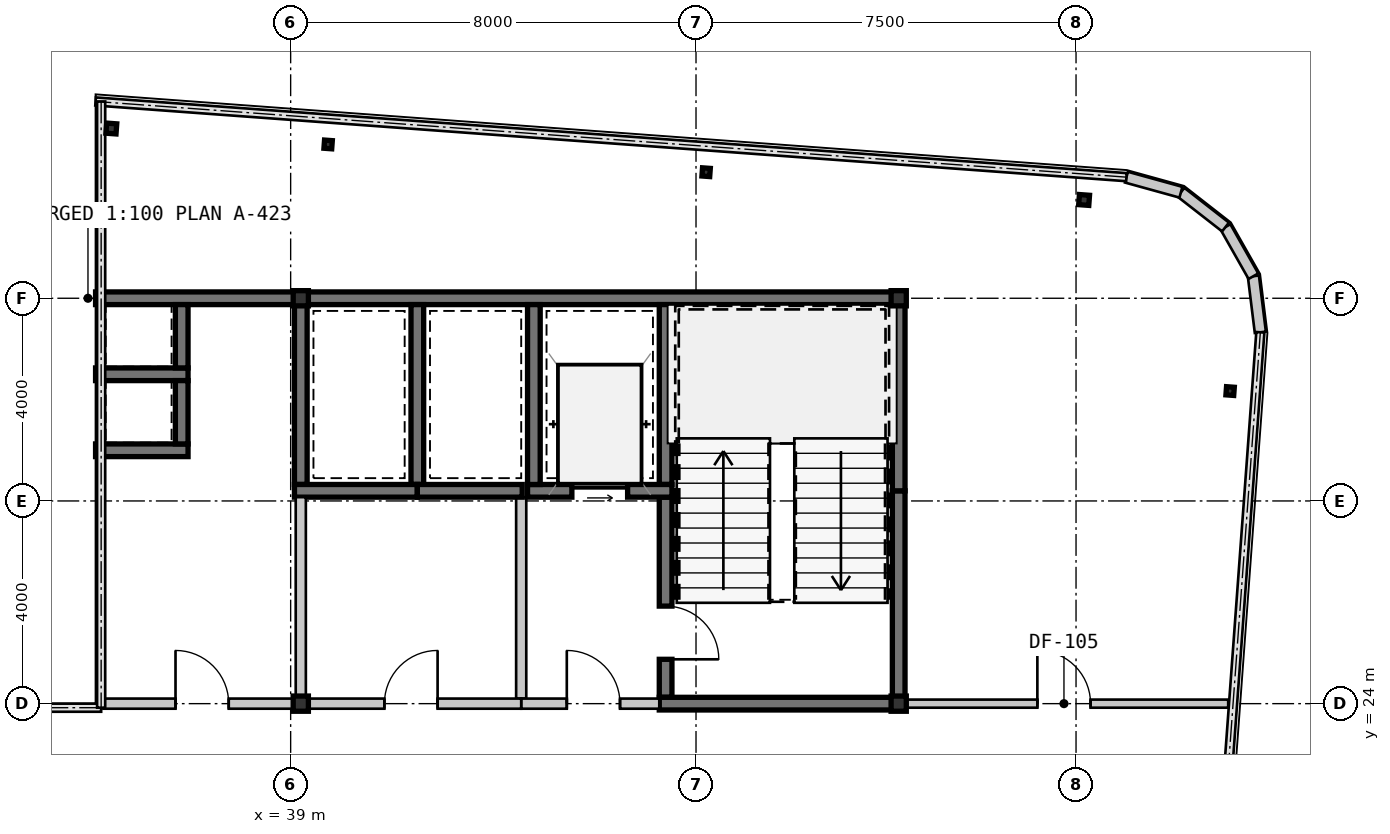
"""IFC4 building model, lengths in metres.
Left out: names, types, materials, properties, quantities, classifications, styles, units other than length and angle.
Written with IfcOpenShell. Run it as: python <this file> out.ifc"""

import sys

from ifc_helpers import new_model, si_unit, direction, frame, frame_2d, origin, origin_2d, place, context, subcontext, project, spatial, rectangle, hollow_rectangle, i_section, extrude, source, transform, mapped, element, fill, save


model = new_model("IFC4")
c1 = context("Model", 3, precision=1e-05, world=origin(), true_north=direction((0.0, 1.0)))
c2 = subcontext(c1, "Body", "Model", "MODEL_VIEW")
j1 = project(units=[si_unit("LENGTHUNIT", "METRE"), si_unit("PLANEANGLEUNIT", "RADIAN")], contexts=[c1])
p1 = place(None, origin())
s1 = spatial("IfcSite", under=j1, at=p1, CompositionType="ELEMENT")
p2 = place(p1, origin())
s2 = spatial("IfcBuilding", under=s1, at=p2, CompositionType="ELEMENT")
p3 = place(p2, frame((0.0, 0.0, 230.3)))
s3 = spatial("IfcBuildingStorey", under=s2, at=p3, CompositionType="ELEMENT", Elevation=230.3)
m1 = source(origin(), c2, "Body", "SweptSolid", [
    extrude(hollow_rectangle(XDim=0.3, YDim=0.3, WallThickness=0.012, at=origin_2d()), origin(), (0.0, 0.0, 1.0), 3.15),
])
for number, where, z_axis, x_axis in (
    (1, (39.2, 24.0, 0.0), (0.0, 0.0, 1.0), (1.0, 0.0, 0.0)),
    (2, (51.0, 24.0, 0.0), (0.0, 0.0, 1.0), (1.0, 0.0, 0.0)),
    (3, (39.2, 32.0, 0.0), (0.0, 0.0, 1.0), (1.0, 0.0, 0.0)),
    (4, (51.0, 32.0, 0.0), (0.0, 0.0, 1.0), (1.0, 0.0, 0.0)),
):
    element("IfcColumn", number, at=place(p3, frame(where, z_axis=z_axis, x_axis=x_axis)), inside=s3, PredefinedType="COLUMN", context=c2, shape_type="MappedRepresentation", body=[
        mapped(m1, transform((0.0, 0.0, 0.0), scale=1.0)),
    ])
m2 = source(origin(), c2, "Body", "SweptSolid", [
    extrude(i_section(OverallWidth=0.154, OverallDepth=0.162, WebThickness=0.008, FlangeThickness=0.011, at=origin_2d()), origin(), (0.0, 0.0, 1.0), 3.15),
])
for number, where, z_axis, x_axis in (
    (5, (39.74, 35.035, 0.0), (0.0, 0.0, 1.0), (0.997, -0.073, 0.0)),
    (6, (47.199, 34.488, 0.0), (0.0, 0.0, 1.0), (0.997, -0.073, 0.0)),
):
    element("IfcColumn", number, at=place(p3, frame(where, z_axis=z_axis, x_axis=x_axis)), inside=s3, PredefinedType="COLUMN", context=c2, shape_type="MappedRepresentation", body=[
        mapped(m2, transform((0.0, 0.0, 0.0), scale=1.0)),
    ])
m3 = source(origin(), c2, "Body", "SweptSolid", [
    extrude(hollow_rectangle(XDim=0.2, YDim=0.2, WallThickness=0.009, at=origin_2d()), origin(), (0.0, 0.0, 1.0), 3.15),
])
p4 = place(p3, frame((54.659, 33.94, 0.0), z_axis=(0.0, 0.0, 1.0), x_axis=(0.997314477224, -0.073238197128, 0.0)))
e7 = element("IfcColumn", 7, at=p4, inside=s3, PredefinedType="COLUMN", context=c2, shape_type="MappedRepresentation", body=[
    mapped(m3, transform((0.0, 0.0, 0.0), scale=1.0)),
])
p5 = place(p3, frame((57.541, 30.169, 0.0), z_axis=(0.0, 0.0, 1.0), x_axis=(0.997314477224, -0.073238197128, 0.0)))
e8 = element("IfcColumn", 8, at=p5, inside=s3, PredefinedType="COLUMN", context=c2, shape_type="MappedRepresentation", body=[
    mapped(m2, transform((0.0, 0.0, 0.0), scale=1.0)),
])
p6 = place(p3, frame((35.461, 35.35, 0.0), z_axis=(0.0, 0.0, 1.0), x_axis=(0.997314477224, -0.073238197128, 0.0)))
e9 = element("IfcColumn", 9, at=p6, inside=s3, PredefinedType="COLUMN", context=c2, shape_type="MappedRepresentation", body=[
    mapped(m3, transform((0.0, 0.0, 0.0), scale=1.0)),
])
m4 = source(origin(), c2, "Body", "SweptSolid", [
    extrude(rectangle(XDim=1.116, YDim=0.22, at=frame_2d((0.558, 0.0))), origin(), (0.0, 0.0, 1.0), 2.93),
])
p7 = place(p3, frame((58.137, 31.328, 0.0), z_axis=(0.0, 0.0, 1.0), x_axis=(-0.122742076028, 0.992438604032, 0.0)))
e10 = element("IfcWall", 10, at=p7, inside=s3, PredefinedType="SOLIDWALL", context=c2, shape_type="MappedRepresentation", body=[
    mapped(m4, transform((0.0, 0.0, 0.0), scale=1.0)),
])
m5 = source(origin(), c2, "Body", "SweptSolid", [
    extrude(rectangle(XDim=1.116, YDim=0.22, at=frame_2d((0.558, 0.0))), origin(), (0.0, 0.0, 1.0), 2.93),
])
p8 = place(p3, frame((58.0, 32.436, 0.0), z_axis=(0.0, 0.0, 1.0), x_axis=(-0.493167138628, 0.869934579941, 0.0)))
e11 = element("IfcWall", 11, at=p8, inside=s3, PredefinedType="SOLIDWALL", context=c2, shape_type="MappedRepresentation", body=[
    mapped(m5, transform((0.0, 0.0, 0.0), scale=1.0)),
])
p9 = place(p3, frame((57.45, 33.406, 0.0), z_axis=(0.0, 0.0, 1.0), x_axis=(-0.788597772321, 0.614909386406, 0.0)))
e12 = element("IfcWall", 12, at=p9, inside=s3, PredefinedType="SOLIDWALL", context=c2, shape_type="MappedRepresentation", body=[
    mapped(m4, transform((0.0, 0.0, 0.0), scale=1.0)),
])
p10 = place(p3, frame((56.57, 34.093, 0.0), z_axis=(0.0, 0.0, 1.0), x_axis=(-0.963833843713, 0.266503886865, 0.0)))
e13 = element("IfcWall", 13, at=p10, inside=s3, PredefinedType="SOLIDWALL", context=c2, shape_type="MappedRepresentation", body=[
    mapped(m5, transform((0.0, 0.0, 0.0), scale=1.0)),
])
m6 = source(origin(), c2, "Body", "SweptSolid", [
    extrude(rectangle(XDim=4.05, YDim=0.25, at=frame_2d((2.025, 0.0))), origin(), (0.0, 0.0, 1.0), 2.93),
])
p11 = place(p3, frame((35.15, 32.0, 0.0), z_axis=(0.0, 0.0, 1.0), x_axis=(1.0, 0.0, 0.0)))
e14 = element("IfcWall", 14, at=p11, inside=s3, PredefinedType="SHEAR", context=c2, shape_type="MappedRepresentation", body=[
    mapped(m6, transform((0.0, 0.0, 0.0), scale=1.0)),
])
m7 = source(origin(), c2, "Body", "SweptSolid", [
    extrude(rectangle(XDim=11.925, YDim=0.25, at=frame_2d((5.962, 0.0))), origin(), (0.0, 0.0, 1.0), 2.93),
])
p12 = place(p3, frame((39.2, 32.0, 0.0), z_axis=(0.0, 0.0, 1.0), x_axis=(1.0, 0.0, 0.0)))
e15 = element("IfcWall", 15, at=p12, inside=s3, PredefinedType="SHEAR", context=c2, shape_type="MappedRepresentation", body=[
    mapped(m7, transform((0.0, 0.0, 0.0), scale=1.0)),
])
m8 = source(origin(), c2, "Body", "SweptSolid", [
    extrude(rectangle(XDim=4.075, YDim=0.25, at=frame_2d((2.038, 0.0))), origin(), (0.0, 0.0, 1.0), 2.93),
])
p13 = place(p3, frame((51.0, 24.125, 0.0), z_axis=(0.0, 0.0, 1.0), x_axis=(0.0, 1.0, 0.0)))
e16 = element("IfcWall", 16, at=p13, inside=s3, PredefinedType="SHEAR", context=c2, shape_type="MappedRepresentation", body=[
    mapped(m8, transform((0.0, 0.0, 0.0), scale=1.0)),
])
m9 = source(origin(), c2, "Body", "SweptSolid", [
    extrude(rectangle(XDim=3.675, YDim=0.25, at=frame_2d((1.837, 0.0))), origin(), (0.0, 0.0, 1.0), 2.93),
])
p14 = place(p3, frame((51.0, 28.2, 0.0), z_axis=(0.0, 0.0, 1.0), x_axis=(0.0, 1.0, 0.0)))
e17 = element("IfcWall", 17, at=p14, inside=s3, PredefinedType="SHEAR", context=c2, shape_type="MappedRepresentation", body=[
    mapped(m9, transform((0.0, 0.0, 0.0), scale=1.0)),
])
m10 = source(origin(), c2, "Body", "SweptSolid", [
    extrude(rectangle(XDim=3.55, YDim=0.25, at=frame_2d((1.775, 0.0))), origin(), (0.0, 0.0, 1.0), 2.93),
])
p15 = place(p3, frame((46.4, 31.875, 0.0), z_axis=(0.0, 0.0, 1.0), x_axis=(0.0, -1.0, 0.0)))
e18 = element("IfcWall", 18, at=p15, inside=s3, PredefinedType="SHEAR", context=c2, shape_type="MappedRepresentation", body=[
    mapped(m10, transform((0.0, 0.0, 0.0), scale=1.0)),
])
m11 = source(origin(), c2, "Body", "SweptSolid", [
    extrude(rectangle(XDim=3.95, YDim=0.25, at=frame_2d((1.975, 0.0))), origin(), (0.0, 0.0, 1.0), 2.93),
])
p16 = place(p3, frame((46.4, 28.075, 0.0), z_axis=(0.0, 0.0, 1.0), x_axis=(0.0, -1.0, 0.0)))
e19 = element("IfcWall", 19, at=p16, inside=s3, PredefinedType="SHEAR", context=c2, shape_type="MappedRepresentation", body=[
    mapped(m11, transform((0.0, 0.0, 0.0), scale=1.0)),
])
m12 = source(origin(), c2, "Body", "SweptSolid", [
    extrude(rectangle(XDim=1.05, YDim=2.1, at=frame_2d((0.525, 1.05))), frame((0.0, 0.135, 0.0), z_axis=(0.0, -1.0, 0.0), x_axis=(1.0, 0.0, 0.0)), (0.0, 0.0, 1.0), 0.27),
])
p17 = place(p16, frame((2.15, 0.0, 0.0)))
e20 = element("IfcOpeningElement", 20, at=p17, cuts=e19, PredefinedType="OPENING", context=c2, shape_type="MappedRepresentation", body=[
    mapped(m12, transform((0.0, 0.0, 0.0), scale=1.0)),
])
m13 = source(origin(), c2, "Body", "SweptSolid", [
    extrude(rectangle(XDim=4.85, YDim=0.25, at=frame_2d((2.425, 0.0))), origin(), (0.0, 0.0, 1.0), 2.93),
])
p18 = place(p3, frame((46.275, 24.0, 0.0), z_axis=(0.0, 0.0, 1.0), x_axis=(1.0, 0.0, 0.0)))
e21 = element("IfcWall", 21, at=p18, inside=s3, PredefinedType="SHEAR", context=c2, shape_type="MappedRepresentation", body=[
    mapped(m13, transform((0.0, 0.0, 0.0), scale=1.0)),
])
m14 = source(origin(), c2, "Body", "SweptSolid", [
    extrude(rectangle(XDim=2.85, YDim=0.25, at=frame_2d((1.425, 0.0))), origin(), (0.0, 0.0, 1.0), 2.93),
])
p19 = place(p3, frame((43.675, 28.2, 0.0), z_axis=(0.0, 0.0, 1.0), x_axis=(1.0, 0.0, 0.0)))
e22 = element("IfcWall", 22, at=p19, inside=s3, PredefinedType="SHEAR", context=c2, shape_type="MappedRepresentation", body=[
    mapped(m14, transform((0.0, 0.0, 0.0), scale=1.0)),
])
m15 = source(origin(), c2, "Body", "SweptSolid", [
    extrude(rectangle(XDim=1.1, YDim=2.15, at=frame_2d((0.55, 1.075))), frame((0.0, 0.135, 0.0), z_axis=(0.0, -1.0, 0.0), x_axis=(1.0, 0.0, 0.0)), (0.0, 0.0, 1.0), 0.27),
])
p20 = place(p19, frame((0.875, 0.0, 0.0)))
e23 = element("IfcOpeningElement", 23, at=p20, cuts=e22, PredefinedType="OPENING", context=c2, shape_type="MappedRepresentation", body=[
    mapped(m15, transform((0.0, 0.0, 0.0), scale=1.0)),
])
p21 = place(p3, frame((43.8, 31.875, 0.0), z_axis=(0.0, 0.0, 1.0), x_axis=(0.0, -1.0, 0.0)))
e24 = element("IfcWall", 24, at=p21, inside=s3, PredefinedType="SHEAR", context=c2, shape_type="MappedRepresentation", body=[
    mapped(m10, transform((0.0, 0.0, 0.0), scale=1.0)),
])
m16 = source(origin(), c2, "Body", "SweptSolid", [
    extrude(rectangle(XDim=3.975, YDim=0.2, at=frame_2d((1.987, 0.0))), origin(), (0.0, 0.0, 1.0), 2.93),
])
p22 = place(p3, frame((43.55, 28.075, 0.0), z_axis=(0.0, 0.0, 1.0), x_axis=(0.0, -1.0, 0.0)))
e25 = element("IfcWall", 25, at=p22, inside=s3, PredefinedType="SOLIDWALL", context=c2, shape_type="MappedRepresentation", body=[
    mapped(m16, transform((0.0, 0.0, 0.0), scale=1.0)),
])
m17 = source(origin(), c2, "Body", "SweptSolid", [
    extrude(rectangle(XDim=2.725, YDim=0.2, at=frame_2d((1.362, 0.0))), origin(), (0.0, 0.0, 1.0), 2.397),
])
p23 = place(p3, frame((43.55, 24.0, 0.0), z_axis=(0.0, 0.0, 1.0), x_axis=(1.0, 0.0, 0.0)))
e26 = element("IfcWall", 26, at=p23, inside=s3, PredefinedType="SOLIDWALL", context=c2, shape_type="MappedRepresentation", body=[
    mapped(m17, transform((0.0, 0.0, 0.0), scale=1.0)),
])
m18 = source(origin(), c2, "Body", "SweptSolid", [
    extrude(rectangle(XDim=1.05, YDim=2.1, at=frame_2d((0.525, 1.05))), frame((0.0, 0.11, 0.0), z_axis=(0.0, -1.0, 0.0), x_axis=(1.0, 0.0, 0.0)), (0.0, 0.0, 1.0), 0.22),
])
p24 = place(p23, frame((0.9, 0.0, 0.0)))
e27 = element("IfcOpeningElement", 27, at=p24, cuts=e26, PredefinedType="OPENING", context=c2, shape_type="MappedRepresentation", body=[
    mapped(m18, transform((0.0, 0.0, 0.0), scale=1.0)),
])
m19 = source(origin(), c2, "Body", "SweptSolid", [
    extrude(rectangle(XDim=1.825, YDim=0.25, at=frame_2d((0.913, 0.0))), origin(), (0.0, 0.0, 1.0), 2.93),
])
p25 = place(p3, frame((35.15, 30.5, 0.0), z_axis=(0.0, 0.0, 1.0), x_axis=(1.0, 0.0, 0.0)))
e28 = element("IfcWall", 28, at=p25, inside=s3, PredefinedType="SHEAR", context=c2, shape_type="MappedRepresentation", body=[
    mapped(m19, transform((0.0, 0.0, 0.0), scale=1.0)),
])
m20 = source(origin(), c2, "Body", "SweptSolid", [
    extrude(rectangle(XDim=1.25, YDim=0.25, at=frame_2d((0.625, 0.0))), origin(), (0.0, 0.0, 1.0), 2.93),
])
p26 = place(p3, frame((36.85, 30.625, 0.0), z_axis=(0.0, 0.0, 1.0), x_axis=(0.0, 1.0, 0.0)))
e29 = element("IfcWall", 29, at=p26, inside=s3, PredefinedType="SHEAR", context=c2, shape_type="MappedRepresentation", body=[
    mapped(m20, transform((0.0, 0.0, 0.0), scale=1.0)),
])
p27 = place(p3, frame((35.15, 29.0, 0.0), z_axis=(0.0, 0.0, 1.0), x_axis=(1.0, 0.0, 0.0)))
e30 = element("IfcWall", 30, at=p27, inside=s3, PredefinedType="SHEAR", context=c2, shape_type="MappedRepresentation", body=[
    mapped(m19, transform((0.0, 0.0, 0.0), scale=1.0)),
])
p28 = place(p3, frame((36.85, 29.125, 0.0), z_axis=(0.0, 0.0, 1.0), x_axis=(0.0, 1.0, 0.0)))
e31 = element("IfcWall", 31, at=p28, inside=s3, PredefinedType="SHEAR", context=c2, shape_type="MappedRepresentation", body=[
    mapped(m20, transform((0.0, 0.0, 0.0), scale=1.0)),
])
for number, where, z_axis, x_axis in (
    (32, (41.5, 28.325, 0.0), (0.0, 0.0, 1.0), (0.0, 1.0, 0.0)),
    (33, (39.2, 31.875, 0.0), (0.0, 0.0, 1.0), (0.0, -1.0, 0.0)),
):
    element("IfcWall", number, at=place(p3, frame(where, z_axis=z_axis, x_axis=x_axis)), inside=s3, PredefinedType="SHEAR", context=c2, shape_type="MappedRepresentation", body=[
        mapped(m10, transform((0.0, 0.0, 0.0), scale=1.0)),
    ])
m21 = source(origin(), c2, "Body", "SweptSolid", [
    extrude(rectangle(XDim=2.425, YDim=0.25, at=frame_2d((1.212, 0.0))), origin(), (0.0, 0.0, 1.0), 2.93),
])
p29 = place(p3, frame((39.075, 28.2, 0.0), z_axis=(0.0, 0.0, 1.0), x_axis=(1.0, 0.0, 0.0)))
e34 = element("IfcWall", 34, at=p29, inside=s3, PredefinedType="SHEAR", context=c2, shape_type="MappedRepresentation", body=[
    mapped(m21, transform((0.0, 0.0, 0.0), scale=1.0)),
])
m22 = source(origin(), c2, "Body", "SweptSolid", [
    extrude(rectangle(XDim=2.07, YDim=0.25, at=frame_2d((1.035, 0.0))), origin(), (0.0, 0.0, 1.0), 2.93),
])
p30 = place(p3, frame((41.5, 28.2, 0.0), z_axis=(0.0, 0.0, 1.0), x_axis=(1.0, 0.0, 0.0)))
e35 = element("IfcWall", 35, at=p30, inside=s3, PredefinedType="SHEAR", context=c2, shape_type="MappedRepresentation", body=[
    mapped(m22, transform((0.0, 0.0, 0.0), scale=1.0)),
])
m23 = source(origin(), c2, "Body", "SweptSolid", [
    extrude(rectangle(XDim=3.975, YDim=0.2, at=frame_2d((1.987, 0.0))), origin(), (0.0, 0.0, 1.0), 2.47),
])
p31 = place(p3, frame((39.2, 28.075, 0.0), z_axis=(0.0, 0.0, 1.0), x_axis=(0.0, -1.0, 0.0)))
e36 = element("IfcWall", 36, at=p31, inside=s3, PredefinedType="SOLIDWALL", context=c2, shape_type="MappedRepresentation", body=[
    mapped(m23, transform((0.0, 0.0, 0.0), scale=1.0)),
])
m24 = source(origin(), c2, "Body", "SweptSolid", [
    extrude(rectangle(XDim=3.895, YDim=0.2, at=frame_2d((1.947, 0.0))), origin(), (0.0, 0.0, 1.0), 2.23),
])
p32 = place(p3, frame((39.2, 24.0, 0.0), z_axis=(0.0, 0.0, 1.0), x_axis=(-1.0, 0.0, 0.0)))
e37 = element("IfcWall", 37, at=p32, inside=s3, PredefinedType="SOLIDWALL", context=c2, shape_type="MappedRepresentation", body=[
    mapped(m24, transform((0.0, 0.0, 0.0), scale=1.0)),
])
p33 = place(p32, frame((1.422, 0.0, 0.0)))
e38 = element("IfcOpeningElement", 38, at=p33, cuts=e37, PredefinedType="OPENING", context=c2, shape_type="MappedRepresentation", body=[
    mapped(m18, transform((0.0, 0.0, 0.0), scale=1.0)),
])
m25 = source(origin(), c2, "Body", "SweptSolid", [
    extrude(rectangle(XDim=4.35, YDim=0.2, at=frame_2d((2.175, 0.0))), origin(), (0.0, 0.0, 1.0), 2.397),
])
p34 = place(p3, frame((43.55, 24.0, 0.0), z_axis=(0.0, 0.0, 1.0), x_axis=(-1.0, 0.0, 0.0)))
e39 = element("IfcWall", 39, at=p34, inside=s3, PredefinedType="SOLIDWALL", context=c2, shape_type="MappedRepresentation", body=[
    mapped(m25, transform((0.0, 0.0, 0.0), scale=1.0)),
])
p35 = place(p34, frame((1.65, 0.0, 0.0)))
e40 = element("IfcOpeningElement", 40, at=p35, cuts=e39, PredefinedType="OPENING", context=c2, shape_type="MappedRepresentation", body=[
    mapped(m18, transform((0.0, 0.0, 0.0), scale=1.0)),
])
m26 = source(origin(), c2, "Body", "SweptSolid", [
    extrude(rectangle(XDim=6.378, YDim=0.16, at=frame_2d((3.189, 0.0))), origin(), (0.0, 0.0, 1.0), 2.93),
])
p36 = place(p3, frame((51.125, 24.0, 0.0), z_axis=(0.0, 0.0, 1.0), x_axis=(1.0, 0.0, 0.0)))
e41 = element("IfcWall", 41, at=p36, inside=s3, PredefinedType="PARTITIONING", context=c2, shape_type="MappedRepresentation", body=[
    mapped(m26, transform((0.0, 0.0, 0.0), scale=1.0)),
])
m27 = source(origin(), c2, "Body", "SweptSolid", [
    extrude(rectangle(XDim=1.05, YDim=2.1, at=frame_2d((0.525, 1.05))), frame((0.0, 0.09, 0.0), z_axis=(0.0, -1.0, 0.0), x_axis=(1.0, 0.0, 0.0)), (0.0, 0.0, 1.0), 0.18),
])
p37 = place(p36, frame((2.612, 0.0, 0.0)))
e42 = element("IfcOpeningElement", 42, at=p37, cuts=e41, PredefinedType="OPENING", context=c2, shape_type="MappedRepresentation", body=[
    mapped(m27, transform((0.0, 0.0, 0.0), scale=1.0)),
])
m28 = source(origin(), c2, "Body", "SweptSolid", [
    extrude(rectangle(XDim=1.05, YDim=2.1, at=frame_2d((0.525, 1.05))), frame((0.0, 0.025, 0.0), z_axis=(0.0, -1.0, 0.0), x_axis=(1.0, 0.0, 0.0)), (0.0, 0.0, 1.0), 0.05),
])
p38 = place(p17, origin())
e43 = element("IfcDoor", 43, at=p38, inside=s3, OperationType="SINGLE_SWING_RIGHT", PredefinedType="DOOR", context=c2, shape_type="MappedRepresentation", body=[
    mapped(m28, transform((0.0, 0.0, 0.0), scale=1.0)),
])
fill(e20, e43)
m29 = source(origin(), c2, "Body", "SweptSolid", [
    extrude(rectangle(XDim=1.1, YDim=2.15, at=frame_2d((0.55, 1.075))), frame((0.0, 0.025, 0.0), z_axis=(0.0, -1.0, 0.0), x_axis=(1.0, 0.0, 0.0)), (0.0, 0.0, 1.0), 0.05),
])
p39 = place(p20, origin())
e44 = element("IfcDoor", 44, at=p39, inside=s3, OperationType="SLIDING_TO_LEFT", PredefinedType="DOOR", context=c2, shape_type="MappedRepresentation", body=[
    mapped(m29, transform((0.0, 0.0, 0.0), scale=1.0)),
])
fill(e23, e44)
p40 = place(p24, origin())
e45 = element("IfcDoor", 45, at=p40, inside=s3, OperationType="SINGLE_SWING_LEFT", PredefinedType="DOOR", context=c2, shape_type="MappedRepresentation", body=[
    mapped(m28, transform((0.0, 0.0, 0.0), scale=1.0)),
])
fill(e27, e45)
p41 = place(p33, frame((1.05, 0.0, 0.0), z_axis=(0.0, 0.0, 1.0), x_axis=(-1.0, 0.0, 0.0)))
e46 = element("IfcDoor", 46, at=p41, inside=s3, OperationType="SINGLE_SWING_LEFT", PredefinedType="DOOR", context=c2, shape_type="MappedRepresentation", body=[
    mapped(m28, transform((0.0, 0.0, 0.0), scale=1.0)),
])
fill(e38, e46)
p42 = place(p35, frame((1.05, 0.0, 0.0), z_axis=(0.0, 0.0, 1.0), x_axis=(-1.0, 0.0, 0.0)))
e47 = element("IfcDoor", 47, at=p42, inside=s3, OperationType="SINGLE_SWING_RIGHT", PredefinedType="DOOR", context=c2, shape_type="MappedRepresentation", body=[
    mapped(m28, transform((0.0, 0.0, 0.0), scale=1.0)),
])
fill(e40, e47)
p43 = place(p37, origin())
e48 = element("IfcDoor", 48, at=p43, inside=s3, OperationType="SINGLE_SWING_LEFT", PredefinedType="DOOR", context=c2, shape_type="MappedRepresentation", body=[
    mapped(m28, transform((0.0, 0.0, 0.0), scale=1.0)),
])
fill(e42, e48)
save(model, sys.argv[1])
